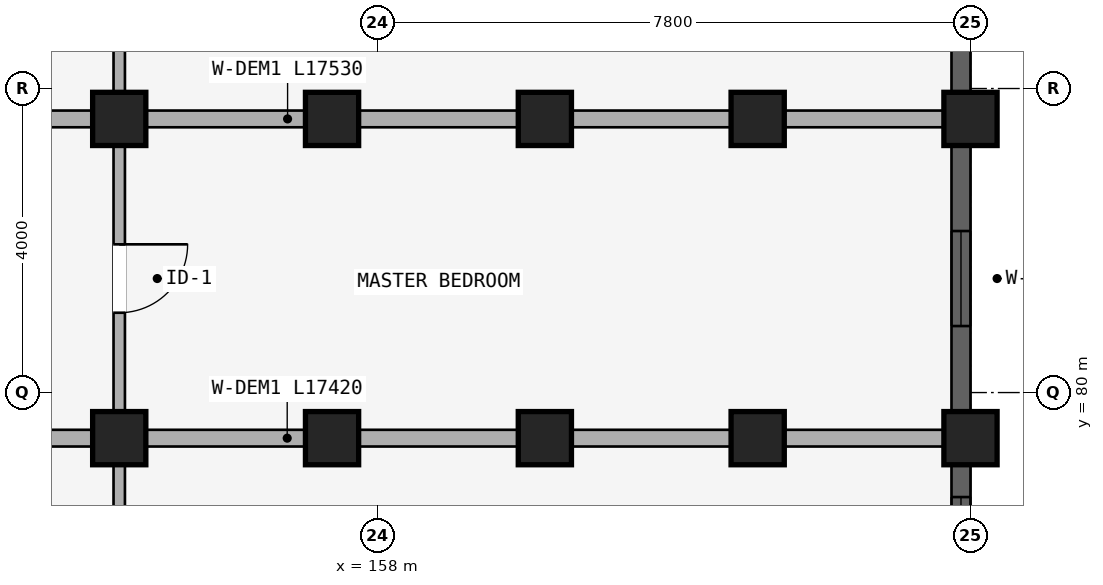
"""IFC4 building model, lengths in metres.
Left out: names, types, materials, properties, quantities, classifications, styles, units other than length and angle.
Written with IfcOpenShell. Run it as: python <this file> out.ifc"""

import sys

from ifc_helpers import new_model, si_unit, direction, frame, frame_2d, origin, origin_2d, place, context, subcontext, project, spatial, rectangle, extrude, element, fill, save


model = new_model("IFC4")
c1 = context("Model", 3, precision=1e-05, world=origin(), true_north=direction((0.0, 1.0)))
c2 = subcontext(c1, "Body", "Model", "MODEL_VIEW")
j1 = project(units=[si_unit("LENGTHUNIT", "METRE"), si_unit("PLANEANGLEUNIT", "RADIAN")], contexts=[c1])
p1 = place(None, origin())
s1 = spatial("IfcSite", under=j1, at=p1, CompositionType="ELEMENT")
p2 = place(p1, origin())
s2 = spatial("IfcBuilding", under=s1, at=p2, CompositionType="ELEMENT")
p3 = place(p2, frame((0.0, 0.0, 24.45)))
s3 = spatial("IfcBuildingStorey", under=s2, at=p3, CompositionType="ELEMENT", Elevation=24.45)
for number, where, z_axis, x_axis in (
    (1, (154.6, 83.6, 0.0), (0.0, 0.0, 1.0), (1.0, 0.0, 0.0)),
    (2, (157.4, 83.6, 0.0), (0.0, 0.0, 1.0), (1.0, 0.0, 0.0)),
    (3, (160.2, 83.6, 0.0), (0.0, 0.0, 1.0), (1.0, 0.0, 0.0)),
    (4, (163.0, 83.6, 0.0), (0.0, 0.0, 1.0), (1.0, 0.0, 0.0)),
    (5, (165.8, 83.6, 0.0), (0.0, 0.0, 1.0), (1.0, 0.0, 0.0)),
    (6, (154.6, 79.4, 0.0), (0.0, 0.0, 1.0), (1.0, 0.0, 0.0)),
    (7, (157.4, 79.4, 0.0), (0.0, 0.0, 1.0), (1.0, 0.0, 0.0)),
    (8, (160.2, 79.4, 0.0), (0.0, 0.0, 1.0), (1.0, 0.0, 0.0)),
    (9, (163.0, 79.4, 0.0), (0.0, 0.0, 1.0), (1.0, 0.0, 0.0)),
    (10, (165.8, 79.4, 0.0), (0.0, 0.0, 1.0), (1.0, 0.0, 0.0)),
):
    element("IfcColumn", number, at=place(p3, frame(where, z_axis=z_axis, x_axis=x_axis)), inside=s3, PredefinedType="COLUMN", context=c2, shape_type="SweptSolid", body=[
        extrude(rectangle(XDim=0.7, YDim=0.7, at=origin_2d()), origin(), (0.0, 0.0, 1.0), 2.93),
    ])
p4 = place(p3, frame((154.6, 87.57, 0.0), z_axis=(0.0, 0.0, 1.0), x_axis=(0.0, -1.0, 0.0)))
e11 = element("IfcWall", 11, at=p4, inside=s3, PredefinedType="PARTITIONING", context=c2, shape_type="SweptSolid", body=[
    extrude(rectangle(XDim=3.89, YDim=0.15, at=frame_2d((1.945, 0.0))), origin(), (0.0, 0.0, 1.0), 2.372),
])
p5 = place(p4, frame((1.495, 0.0, 0.0)))
e12 = element("IfcOpeningElement", 12, at=p5, cuts=e11, PredefinedType="OPENING", context=c2, shape_type="SweptSolid", body=[
    extrude(rectangle(XDim=0.9, YDim=2.1, at=frame_2d((0.45, 1.05))), frame((0.0, 0.085, 0.0), z_axis=(0.0, -1.0, 0.0), x_axis=(1.0, 0.0, 0.0)), (0.0, 0.0, 1.0), 0.17),
])
p6 = place(p3, frame((154.6, 83.52, 0.0), z_axis=(0.0, 0.0, 1.0), x_axis=(0.0, -1.0, 0.0)))
e13 = element("IfcWall", 13, at=p6, inside=s3, PredefinedType="PARTITIONING", context=c2, shape_type="SweptSolid", body=[
    extrude(rectangle(XDim=4.04, YDim=0.15, at=frame_2d((2.02, 0.0))), origin(), (0.0, 0.0, 1.0), 2.372),
])
p7 = place(p6, frame((1.57, 0.0, 0.0)))
e14 = element("IfcOpeningElement", 14, at=p7, cuts=e13, PredefinedType="OPENING", context=c2, shape_type="SweptSolid", body=[
    extrude(rectangle(XDim=0.9, YDim=2.1, at=frame_2d((0.45, 1.05))), frame((0.0, 0.085, 0.0), z_axis=(0.0, -1.0, 0.0), x_axis=(1.0, 0.0, 0.0)), (0.0, 0.0, 1.0), 0.17),
])
p8 = place(p3, frame((148.05, 83.6, 0.0), z_axis=(0.0, 0.0, 1.0), x_axis=(1.0, 0.0, 0.0)))
e15 = element("IfcWall", 15, at=p8, inside=s3, PredefinedType="STANDARD", context=c2, shape_type="SweptSolid", body=[
    extrude(rectangle(XDim=17.53, YDim=0.22, at=frame_2d((8.765, 0.0))), origin(), (0.0, 0.0, 1.0), 2.372),
])
p9 = place(p3, frame((154.6, 79.32, 0.0), z_axis=(0.0, 0.0, 1.0), x_axis=(0.0, -1.0, 0.0)))
e16 = element("IfcWall", 16, at=p9, inside=s3, PredefinedType="PLUMBINGWALL", context=c2, shape_type="SweptSolid", body=[
    extrude(rectangle(XDim=2.64, YDim=0.15, at=frame_2d((1.32, 0.0))), origin(), (0.0, 0.0, 1.0), 2.372),
])
p10 = place(p9, frame((0.87, 0.0, 0.0)))
e17 = element("IfcOpeningElement", 17, at=p10, cuts=e16, PredefinedType="OPENING", context=c2, shape_type="SweptSolid", body=[
    extrude(rectangle(XDim=0.9, YDim=2.1, at=frame_2d((0.45, 1.05))), frame((0.0, 0.085, 0.0), z_axis=(0.0, -1.0, 0.0), x_axis=(1.0, 0.0, 0.0)), (0.0, 0.0, 1.0), 0.17),
])
p11 = place(p3, frame((148.1, 79.4, 0.0), z_axis=(0.0, 0.0, 1.0), x_axis=(1.0, 0.0, 0.0)))
e18 = element("IfcWall", 18, at=p11, inside=s3, PredefinedType="STANDARD", context=c2, shape_type="SweptSolid", body=[
    extrude(rectangle(XDim=17.42, YDim=0.22, at=frame_2d((8.71, 0.0))), origin(), (0.0, 0.0, 1.0), 2.372),
])
p12 = place(p3, frame((165.675, 87.447, 0.0), z_axis=(0.0, 0.0, 1.0), x_axis=(0.0, -1.0, 0.0)))
e19 = element("IfcWall", 19, at=p12, inside=s3, PredefinedType="STANDARD", context=c2, shape_type="SweptSolid", body=[
    extrude(rectangle(XDim=3.493, YDim=0.25, at=frame_2d((1.747, 0.0))), origin(), (0.0, 0.0, 1.0), 2.472),
])
p13 = place(p12, frame((1.122, 0.0, 0.722)))
e20 = element("IfcOpeningElement", 20, at=p13, cuts=e19, PredefinedType="OPENING", context=c2, shape_type="SweptSolid", body=[
    extrude(rectangle(XDim=1.25, YDim=1.55, at=frame_2d((0.625, 0.775))), frame((0.0, 0.135, 0.0), z_axis=(0.0, -1.0, 0.0), x_axis=(1.0, 0.0, 0.0)), (0.0, 0.0, 1.0), 0.27),
])
p14 = place(p3, frame((165.675, 83.247, 0.0), z_axis=(0.0, 0.0, 1.0), x_axis=(0.0, -1.0, 0.0)))
e21 = element("IfcWall", 21, at=p14, inside=s3, PredefinedType="STANDARD", context=c2, shape_type="SweptSolid", body=[
    extrude(rectangle(XDim=3.493, YDim=0.25, at=frame_2d((1.747, 0.0))), origin(), (0.0, 0.0, 1.0), 2.472),
])
p15 = place(p14, frame((1.122, 0.0, 0.722)))
e22 = element("IfcOpeningElement", 22, at=p15, cuts=e21, PredefinedType="OPENING", context=c2, shape_type="SweptSolid", body=[
    extrude(rectangle(XDim=1.25, YDim=1.55, at=frame_2d((0.625, 0.775))), frame((0.0, 0.135, 0.0), z_axis=(0.0, -1.0, 0.0), x_axis=(1.0, 0.0, 0.0)), (0.0, 0.0, 1.0), 0.27),
])
p16 = place(p3, frame((165.675, 79.046, 0.0), z_axis=(0.0, 0.0, 1.0), x_axis=(0.0, -1.0, 0.0)))
e23 = element("IfcWall", 23, at=p16, inside=s3, PredefinedType="STANDARD", context=c2, shape_type="SweptSolid", body=[
    extrude(rectangle(XDim=2.093, YDim=0.25, at=frame_2d((1.046, 0.0))), origin(), (0.0, 0.0, 1.0), 2.472),
])
p17 = place(p16, frame((0.421, 0.0, 0.722)))
e24 = element("IfcOpeningElement", 24, at=p17, cuts=e23, PredefinedType="OPENING", context=c2, shape_type="SweptSolid", body=[
    extrude(rectangle(XDim=1.25, YDim=1.55, at=frame_2d((0.625, 0.775))), frame((0.0, 0.135, 0.0), z_axis=(0.0, -1.0, 0.0), x_axis=(1.0, 0.0, 0.0)), (0.0, 0.0, 1.0), 0.27),
])
p18 = place(p15, origin())
e25 = element("IfcWindow", 25, at=p18, inside=s3, PartitioningType="SINGLE_PANEL", PredefinedType="WINDOW", context=c2, shape_type="SweptSolid", body=[
    extrude(rectangle(XDim=1.25, YDim=1.55, at=frame_2d((0.625, 0.775))), frame((0.0, 0.03, 0.0), z_axis=(0.0, -1.0, 0.0), x_axis=(1.0, 0.0, 0.0)), (0.0, 0.0, 1.0), 0.06),
])
fill(e22, e25)
p19 = place(p17, origin())
e26 = element("IfcWindow", 26, at=p19, inside=s3, PartitioningType="SINGLE_PANEL", PredefinedType="WINDOW", context=c2, shape_type="SweptSolid", body=[
    extrude(rectangle(XDim=1.25, YDim=1.55, at=frame_2d((0.625, 0.775))), frame((0.0, 0.03, 0.0), z_axis=(0.0, -1.0, 0.0), x_axis=(1.0, 0.0, 0.0)), (0.0, 0.0, 1.0), 0.06),
])
fill(e24, e26)
p20 = place(p7, frame((0.9, 0.0, 0.0), z_axis=(0.0, 0.0, 1.0), x_axis=(-1.0, 0.0, 0.0)))
e27 = element("IfcDoor", 27, at=p20, inside=s3, OperationType="SINGLE_SWING_RIGHT", PredefinedType="DOOR", context=c2, shape_type="SweptSolid", body=[
    extrude(rectangle(XDim=0.9, YDim=2.1, at=frame_2d((0.45, 1.05))), frame((0.0, 0.025, 0.0), z_axis=(0.0, -1.0, 0.0), x_axis=(1.0, 0.0, 0.0)), (0.0, 0.0, 1.0), 0.05),
])
fill(e14, e27)
save(model, sys.argv[1])
